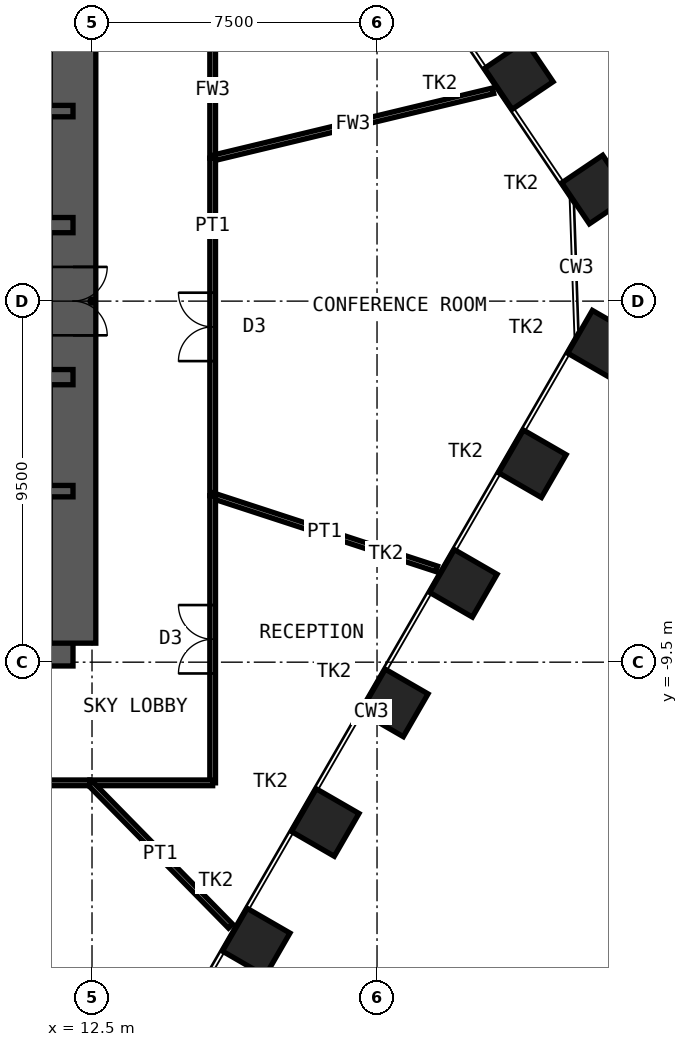
"""IFC4 building model, lengths in metres.
Left out: names, types, materials, properties, quantities, classifications, styles, units other than length and angle.
Written with IfcOpenShell. Run it as: python <this file> out.ifc"""

import sys

from ifc_helpers import new_model, si_unit, direction, frame, frame_2d, origin, origin_2d, place, context, subcontext, project, spatial, rectangle, hollow_rectangle, extrude, element, fill, save


model = new_model("IFC4")
c1 = context("Model", 3, precision=1e-05, world=origin(), true_north=direction((0.0, 1.0)))
c2 = subcontext(c1, "Body", "Model", "MODEL_VIEW")
j1 = project(units=[si_unit("LENGTHUNIT", "METRE"), si_unit("PLANEANGLEUNIT", "RADIAN")], contexts=[c1])
p1 = place(None, origin())
s1 = spatial("IfcSite", under=j1, at=p1, CompositionType="ELEMENT")
p2 = place(p1, origin())
s2 = spatial("IfcBuilding", under=s1, at=p2, CompositionType="ELEMENT")
p3 = place(p2, frame((0.0, 0.0, 180.4)))
s3 = spatial("IfcBuildingStorey", under=s2, at=p3, CompositionType="ELEMENT", Elevation=180.4)
for number, where, z_axis, x_axis in (
    (1, (23.731, 5.948, 0.0), (0.0, 0.0, 1.0), (-0.559, 0.829, 0.0)),
    (2, (25.762, 2.936, 0.0), (0.0, 0.0, 1.0), (-0.559, 0.829, 0.0)),
    (3, (25.905, -1.132, 0.0), (0.0, 0.0, 1.0), (0.5, 0.866, 0.0)),
    (4, (24.088, -4.279, 0.0), (0.0, 0.0, 1.0), (0.5, 0.866, 0.0)),
    (5, (22.271, -7.426, 0.0), (0.0, 0.0, 1.0), (0.5, 0.866, 0.0)),
    (6, (20.454, -10.572, 0.0), (0.0, 0.0, 1.0), (0.5, 0.866, 0.0)),
    (7, (18.637, -13.719, 0.0), (0.0, 0.0, 1.0), (0.5, 0.866, 0.0)),
    (8, (16.821, -16.866, 0.0), (0.0, 0.0, 1.0), (0.5, 0.866, 0.0)),
):
    element("IfcColumn", number, at=place(p3, frame(where, z_axis=z_axis, x_axis=x_axis)), inside=s3, PredefinedType="COLUMN", context=c2, shape_type="SweptSolid", body=[
        extrude(hollow_rectangle(XDim=1.3, YDim=1.3, WallThickness=0.1, at=origin_2d()), origin(), (0.0, 0.0, 1.0), 4.2),
    ])
p4 = place(p3, frame((-12.0, -9.0, 0.0), z_axis=(0.0, 0.0, 1.0), x_axis=(1.0, 0.0, 0.0)))
e9 = element("IfcWall", 9, at=p4, inside=s3, PredefinedType="SHEAR", context=c2, shape_type="SweptSolid", body=[
    extrude(rectangle(XDim=24.0, YDim=1.2, at=frame_2d((12.0, 0.0))), origin(), (0.0, 0.0, 1.0), 4.2),
])
p5 = place(p4, frame((1.35, 0.0, 0.0)))
e10 = element("IfcOpeningElement", 10, at=p5, cuts=e9, PredefinedType="OPENING", context=c2, shape_type="SweptSolid", body=[
    extrude(rectangle(XDim=1.0, YDim=2.1, at=frame_2d((0.5, 1.05))), frame((0.0, 0.61, 0.0), z_axis=(0.0, -1.0, 0.0), x_axis=(1.0, 0.0, 0.0)), (0.0, 0.0, 1.0), 1.22),
])
p6 = place(p4, frame((5.325, 0.0, 0.0)))
e11 = element("IfcOpeningElement", 11, at=p6, cuts=e9, PredefinedType="OPENING", context=c2, shape_type="SweptSolid", body=[
    extrude(rectangle(XDim=1.15, YDim=2.1, at=frame_2d((0.575, 1.05))), frame((0.0, 0.61, 0.0), z_axis=(0.0, -1.0, 0.0), x_axis=(1.0, 0.0, 0.0)), (0.0, 0.0, 1.0), 1.22),
])
p7 = place(p4, frame((12.6, 0.0, 0.0)))
e12 = element("IfcOpeningElement", 12, at=p7, cuts=e9, PredefinedType="OPENING", context=c2, shape_type="SweptSolid", body=[
    extrude(rectangle(XDim=1.0, YDim=2.1, at=frame_2d((0.5, 1.05))), frame((0.0, 0.61, 0.0), z_axis=(0.0, -1.0, 0.0), x_axis=(1.0, 0.0, 0.0)), (0.0, 0.0, 1.0), 1.22),
])
p8 = place(p3, frame((12.0, -9.0, 0.0), z_axis=(0.0, 0.0, 1.0), x_axis=(0.0, 1.0, 0.0)))
e13 = element("IfcWall", 13, at=p8, inside=s3, PredefinedType="SHEAR", context=c2, shape_type="SweptSolid", body=[
    extrude(rectangle(XDim=18.0, YDim=1.2, at=frame_2d((9.0, 0.0))), origin(), (0.0, 0.0, 1.0), 4.2),
])
p9 = place(p8, frame((8.1, 0.0, 0.0)))
e14 = element("IfcOpeningElement", 14, at=p9, cuts=e13, PredefinedType="OPENING", context=c2, shape_type="SweptSolid", body=[
    extrude(rectangle(XDim=1.8, YDim=2.1, at=frame_2d((0.9, 1.05))), frame((0.0, 0.61, 0.0), z_axis=(0.0, -1.0, 0.0), x_axis=(1.0, 0.0, 0.0)), (0.0, 0.0, 1.0), 1.22),
])
p10 = place(p3, frame((-12.0, 5.0, 0.0), z_axis=(0.0, 0.0, 1.0), x_axis=(1.0, 0.0, 0.0)))
e15 = element("IfcWall", 15, at=p10, inside=s3, PredefinedType="SHEAR", context=c2, shape_type="SweptSolid", body=[
    extrude(rectangle(XDim=24.0, YDim=0.3, at=frame_2d((12.0, 0.0))), origin(), (0.0, 0.0, 1.0), 4.2),
])
p11 = place(p3, frame((-12.0, 2.0, 0.0), z_axis=(0.0, 0.0, 1.0), x_axis=(1.0, 0.0, 0.0)))
e16 = element("IfcWall", 16, at=p11, inside=s3, PredefinedType="SHEAR", context=c2, shape_type="SweptSolid", body=[
    extrude(rectangle(XDim=24.0, YDim=0.4, at=frame_2d((12.0, 0.0))), origin(), (0.0, 0.0, 1.0), 4.2),
])
p12 = place(p11, frame((2.4, 0.0, 0.0)))
e17 = element("IfcOpeningElement", 17, at=p12, cuts=e16, PredefinedType="OPENING", context=c2, shape_type="SweptSolid", body=[
    extrude(rectangle(XDim=1.1, YDim=2.1, at=frame_2d((0.55, 1.05))), frame((0.0, 0.21, 0.0), z_axis=(0.0, -1.0, 0.0), x_axis=(1.0, 0.0, 0.0)), (0.0, 0.0, 1.0), 0.42),
])
p13 = place(p11, frame((22.0, 0.0, 0.0)))
e18 = element("IfcOpeningElement", 18, at=p13, cuts=e16, PredefinedType="OPENING", context=c2, shape_type="SweptSolid", body=[
    extrude(rectangle(XDim=1.1, YDim=2.1, at=frame_2d((0.55, 1.05))), frame((0.0, 0.21, 0.0), z_axis=(0.0, -1.0, 0.0), x_axis=(1.0, 0.0, 0.0)), (0.0, 0.0, 1.0), 0.42),
])
p14 = place(p11, frame((10.15, 0.0, 0.0)))
e19 = element("IfcOpeningElement", 19, at=p14, cuts=e16, PredefinedType="OPENING", context=c2, shape_type="SweptSolid", body=[
    extrude(rectangle(XDim=1.0, YDim=2.1, at=frame_2d((0.5, 1.05))), frame((0.0, 0.21, 0.0), z_axis=(0.0, -1.0, 0.0), x_axis=(1.0, 0.0, 0.0)), (0.0, 0.0, 1.0), 0.42),
])
p15 = place(p11, frame((6.9, 0.0, 0.0)))
e20 = element("IfcOpeningElement", 20, at=p15, cuts=e16, PredefinedType="OPENING", context=c2, shape_type="SweptSolid", body=[
    extrude(rectangle(XDim=1.0, YDim=2.1, at=frame_2d((0.5, 1.05))), frame((0.0, 0.21, 0.0), z_axis=(0.0, -1.0, 0.0), x_axis=(1.0, 0.0, 0.0)), (0.0, 0.0, 1.0), 0.42),
])
p16 = place(p11, frame((13.35, 0.0, 0.0)))
e21 = element("IfcOpeningElement", 21, at=p16, cuts=e16, PredefinedType="OPENING", context=c2, shape_type="SweptSolid", body=[
    extrude(rectangle(XDim=1.1, YDim=2.4, at=frame_2d((0.55, 1.2))), frame((0.0, 0.21, 0.0), z_axis=(0.0, -1.0, 0.0), x_axis=(1.0, 0.0, 0.0)), (0.0, 0.0, 1.0), 0.42),
])
p17 = place(p11, frame((16.15, 0.0, 0.0)))
e22 = element("IfcOpeningElement", 22, at=p17, cuts=e16, PredefinedType="OPENING", context=c2, shape_type="SweptSolid", body=[
    extrude(rectangle(XDim=1.1, YDim=2.4, at=frame_2d((0.55, 1.2))), frame((0.0, 0.21, 0.0), z_axis=(0.0, -1.0, 0.0), x_axis=(1.0, 0.0, 0.0)), (0.0, 0.0, 1.0), 0.42),
])
p18 = place(p11, frame((18.95, 0.0, 0.0)))
e23 = element("IfcOpeningElement", 23, at=p18, cuts=e16, PredefinedType="OPENING", context=c2, shape_type="SweptSolid", body=[
    extrude(rectangle(XDim=1.1, YDim=2.4, at=frame_2d((0.55, 1.2))), frame((0.0, 0.21, 0.0), z_axis=(0.0, -1.0, 0.0), x_axis=(1.0, 0.0, 0.0)), (0.0, 0.0, 1.0), 0.42),
])
p19 = place(p3, frame((-12.0, -2.0, 0.0), z_axis=(0.0, 0.0, 1.0), x_axis=(1.0, 0.0, 0.0)))
e24 = element("IfcWall", 24, at=p19, inside=s3, PredefinedType="SHEAR", context=c2, shape_type="SweptSolid", body=[
    extrude(rectangle(XDim=24.0, YDim=0.4, at=frame_2d((12.0, 0.0))), origin(), (0.0, 0.0, 1.0), 4.2),
])
p20 = place(p19, frame((1.1, 0.0, 0.0)))
e25 = element("IfcOpeningElement", 25, at=p20, cuts=e24, PredefinedType="OPENING", context=c2, shape_type="SweptSolid", body=[
    extrude(rectangle(XDim=1.1, YDim=2.1, at=frame_2d((0.55, 1.05))), frame((0.0, 0.21, 0.0), z_axis=(0.0, -1.0, 0.0), x_axis=(1.0, 0.0, 0.0)), (0.0, 0.0, 1.0), 0.42),
])
p21 = place(p19, frame((13.55, 0.0, 0.0)))
e26 = element("IfcOpeningElement", 26, at=p21, cuts=e24, PredefinedType="OPENING", context=c2, shape_type="SweptSolid", body=[
    extrude(rectangle(XDim=1.1, YDim=2.1, at=frame_2d((0.55, 1.05))), frame((0.0, 0.21, 0.0), z_axis=(0.0, -1.0, 0.0), x_axis=(1.0, 0.0, 0.0)), (0.0, 0.0, 1.0), 0.42),
])
p22 = place(p19, frame((20.7, 0.0, 0.0)))
e27 = element("IfcOpeningElement", 27, at=p22, cuts=e24, PredefinedType="OPENING", context=c2, shape_type="SweptSolid", body=[
    extrude(rectangle(XDim=1.1, YDim=2.1, at=frame_2d((0.55, 1.05))), frame((0.0, 0.21, 0.0), z_axis=(0.0, -1.0, 0.0), x_axis=(1.0, 0.0, 0.0)), (0.0, 0.0, 1.0), 0.42),
])
p23 = place(p19, frame((4.0, 0.0, 0.0)))
e28 = element("IfcOpeningElement", 28, at=p23, cuts=e24, PredefinedType="OPENING", context=c2, shape_type="SweptSolid", body=[
    extrude(rectangle(XDim=1.0, YDim=2.1, at=frame_2d((0.5, 1.05))), frame((0.0, 0.21, 0.0), z_axis=(0.0, -1.0, 0.0), x_axis=(1.0, 0.0, 0.0)), (0.0, 0.0, 1.0), 0.42),
])
p24 = place(p19, frame((6.75, 0.0, 0.0)))
e29 = element("IfcOpeningElement", 29, at=p24, cuts=e24, PredefinedType="OPENING", context=c2, shape_type="SweptSolid", body=[
    extrude(rectangle(XDim=1.1, YDim=2.4, at=frame_2d((0.55, 1.2))), frame((0.0, 0.21, 0.0), z_axis=(0.0, -1.0, 0.0), x_axis=(1.0, 0.0, 0.0)), (0.0, 0.0, 1.0), 0.42),
])
p25 = place(p3, frame((-12.0, -5.0, 0.0), z_axis=(0.0, 0.0, 1.0), x_axis=(1.0, 0.0, 0.0)))
e30 = element("IfcWall", 30, at=p25, inside=s3, PredefinedType="SHEAR", context=c2, shape_type="SweptSolid", body=[
    extrude(rectangle(XDim=24.0, YDim=0.3, at=frame_2d((12.0, 0.0))), origin(), (0.0, 0.0, 1.0), 4.2),
])
p26 = place(p3, frame((15.675, 12.675, 0.0), z_axis=(0.0, 0.0, 1.0), x_axis=(0.0, -1.0, 0.0)))
e31 = element("IfcWall", 31, at=p26, inside=s3, PredefinedType="PARTITIONING", context=c2, shape_type="SweptSolid", body=[
    extrude(rectangle(XDim=8.912, YDim=0.15, at=frame_2d((4.456, 0.0))), origin(), (0.0, 0.0, 1.0), 4.03),
])
p27 = place(p26, frame((3.556, 0.0, 0.0)))
e32 = element("IfcOpeningElement", 32, at=p27, cuts=e31, PredefinedType="OPENING", context=c2, shape_type="SweptSolid", body=[
    extrude(rectangle(XDim=1.8, YDim=2.1, at=frame_2d((0.9, 1.05))), frame((0.0, 0.085, 0.0), z_axis=(0.0, -1.0, 0.0), x_axis=(1.0, 0.0, 0.0)), (0.0, 0.0, 1.0), 0.17),
])
p28 = place(p3, frame((23.053, 5.534, 0.0), z_axis=(0.0, 0.0, 1.0), x_axis=(-0.97237853912, -0.233409461376, 0.0)))
e33 = element("IfcWall", 33, at=p28, inside=s3, PredefinedType="PARTITIONING", context=c2, shape_type="SweptSolid", body=[
    extrude(rectangle(XDim=7.587, YDim=0.15, at=frame_2d((3.794, 0.0))), origin(), (0.0, 0.0, 1.0), 2.93),
])
p29 = place(p3, frame((15.675, 3.763, 0.0), z_axis=(0.0, 0.0, 1.0), x_axis=(0.0, -1.0, 0.0)))
e34 = element("IfcWall", 34, at=p29, inside=s3, PredefinedType="PARTITIONING", context=c2, shape_type="SweptSolid", body=[
    extrude(rectangle(XDim=8.882, YDim=0.15, at=frame_2d((4.441, 0.0))), origin(), (0.0, 0.0, 1.0), 4.03),
])
p30 = place(p29, frame((3.541, 0.0, 0.0)))
e35 = element("IfcOpeningElement", 35, at=p30, cuts=e34, PredefinedType="OPENING", context=c2, shape_type="SweptSolid", body=[
    extrude(rectangle(XDim=1.8, YDim=2.4, at=frame_2d((0.9, 1.2))), frame((0.0, 0.085, 0.0), z_axis=(0.0, -1.0, 0.0), x_axis=(1.0, 0.0, 0.0)), (0.0, 0.0, 1.0), 0.17),
])
p31 = place(p3, frame((21.57, -7.044, 0.0), z_axis=(0.0, 0.0, 1.0), x_axis=(-0.950583168705, 0.310470029754, 0.0)))
e36 = element("IfcWall", 36, at=p31, inside=s3, PredefinedType="PARTITIONING", context=c2, shape_type="SweptSolid", body=[
    extrude(rectangle(XDim=6.201, YDim=0.15, at=frame_2d((3.101, 0.0))), origin(), (0.0, 0.0, 1.0), 2.93),
])
p32 = place(p3, frame((15.675, -5.119, 0.0), z_axis=(0.0, 0.0, 1.0), x_axis=(0.0, -1.0, 0.0)))
e37 = element("IfcWall", 37, at=p32, inside=s3, PredefinedType="PARTITIONING", context=c2, shape_type="SweptSolid", body=[
    extrude(rectangle(XDim=7.556, YDim=0.15, at=frame_2d((3.778, 0.0))), origin(), (0.0, 0.0, 1.0), 4.03),
])
p33 = place(p32, frame((2.878, 0.0, 0.0)))
e38 = element("IfcOpeningElement", 38, at=p33, cuts=e37, PredefinedType="OPENING", context=c2, shape_type="SweptSolid", body=[
    extrude(rectangle(XDim=1.8, YDim=2.4, at=frame_2d((0.9, 1.2))), frame((0.0, 0.085, 0.0), z_axis=(0.0, -1.0, 0.0), x_axis=(1.0, 0.0, 0.0)), (0.0, 0.0, 1.0), 0.17),
])
p34 = place(p3, frame((15.675, -12.675, 0.0), z_axis=(0.0, 0.0, 1.0), x_axis=(-1.0, 0.0, 0.0)))
e39 = element("IfcWall", 39, at=p34, inside=s3, PredefinedType="PARTITIONING", context=c2, shape_type="SweptSolid", body=[
    extrude(rectangle(XDim=3.231, YDim=0.15, at=frame_2d((1.616, 0.0))), origin(), (0.0, 0.0, 1.0), 4.03),
])
p35 = place(p3, frame((16.145, -16.444, 0.0), z_axis=(0.0, 0.0, 1.0), x_axis=(-0.700583233902, 0.713570691926, 0.0)))
e40 = element("IfcWall", 40, at=p35, inside=s3, PredefinedType="PARTITIONING", context=c2, shape_type="SweptSolid", body=[
    extrude(rectangle(XDim=5.282, YDim=0.15, at=frame_2d((2.641, 0.0))), origin(), (0.0, 0.0, 1.0), 2.93),
])
p36 = place(p3, frame((12.444, -12.675, 0.0), z_axis=(0.0, 0.0, 1.0), x_axis=(-1.0, 0.0, 0.0)))
e41 = element("IfcWall", 41, at=p36, inside=s3, PredefinedType="PARTITIONING", context=c2, shape_type="SweptSolid", body=[
    extrude(rectangle(XDim=10.082, YDim=0.15, at=frame_2d((5.041, 0.0))), origin(), (0.0, 0.0, 1.0), 4.03),
])
p37 = place(p36, frame((4.141, 0.0, 0.0)))
e42 = element("IfcOpeningElement", 42, at=p37, cuts=e41, PredefinedType="OPENING", context=c2, shape_type="SweptSolid", body=[
    extrude(rectangle(XDim=1.8, YDim=2.4, at=frame_2d((0.9, 1.2))), frame((0.0, 0.085, 0.0), z_axis=(0.0, -1.0, 0.0), x_axis=(1.0, 0.0, 0.0)), (0.0, 0.0, 1.0), 0.17),
])
p38 = place(p9, origin())
e43 = element("IfcDoor", 43, at=p38, inside=s3, OperationType="DOUBLE_DOOR_DOUBLE_SWING", PredefinedType="DOOR", context=c2, shape_type="SweptSolid", body=[
    extrude(rectangle(XDim=1.8, YDim=2.1, at=frame_2d((0.9, 1.05))), frame((0.0, 0.025, 0.0), z_axis=(0.0, -1.0, 0.0), x_axis=(1.0, 0.0, 0.0)), (0.0, 0.0, 1.0), 0.05),
])
fill(e14, e43)
p39 = place(p30, origin())
e44 = element("IfcDoor", 44, at=p39, inside=s3, OperationType="DOUBLE_DOOR_DOUBLE_SWING", PredefinedType="DOOR", context=c2, shape_type="SweptSolid", body=[
    extrude(rectangle(XDim=1.8, YDim=2.4, at=frame_2d((0.9, 1.2))), frame((0.0, 0.025, 0.0), z_axis=(0.0, -1.0, 0.0), x_axis=(1.0, 0.0, 0.0)), (0.0, 0.0, 1.0), 0.05),
])
fill(e35, e44)
p40 = place(p33, origin())
e45 = element("IfcDoor", 45, at=p40, inside=s3, OperationType="DOUBLE_DOOR_DOUBLE_SWING", PredefinedType="DOOR", context=c2, shape_type="SweptSolid", body=[
    extrude(rectangle(XDim=1.8, YDim=2.4, at=frame_2d((0.9, 1.2))), frame((0.0, 0.025, 0.0), z_axis=(0.0, -1.0, 0.0), x_axis=(1.0, 0.0, 0.0)), (0.0, 0.0, 1.0), 0.05),
])
fill(e38, e45)
save(model, sys.argv[1])
